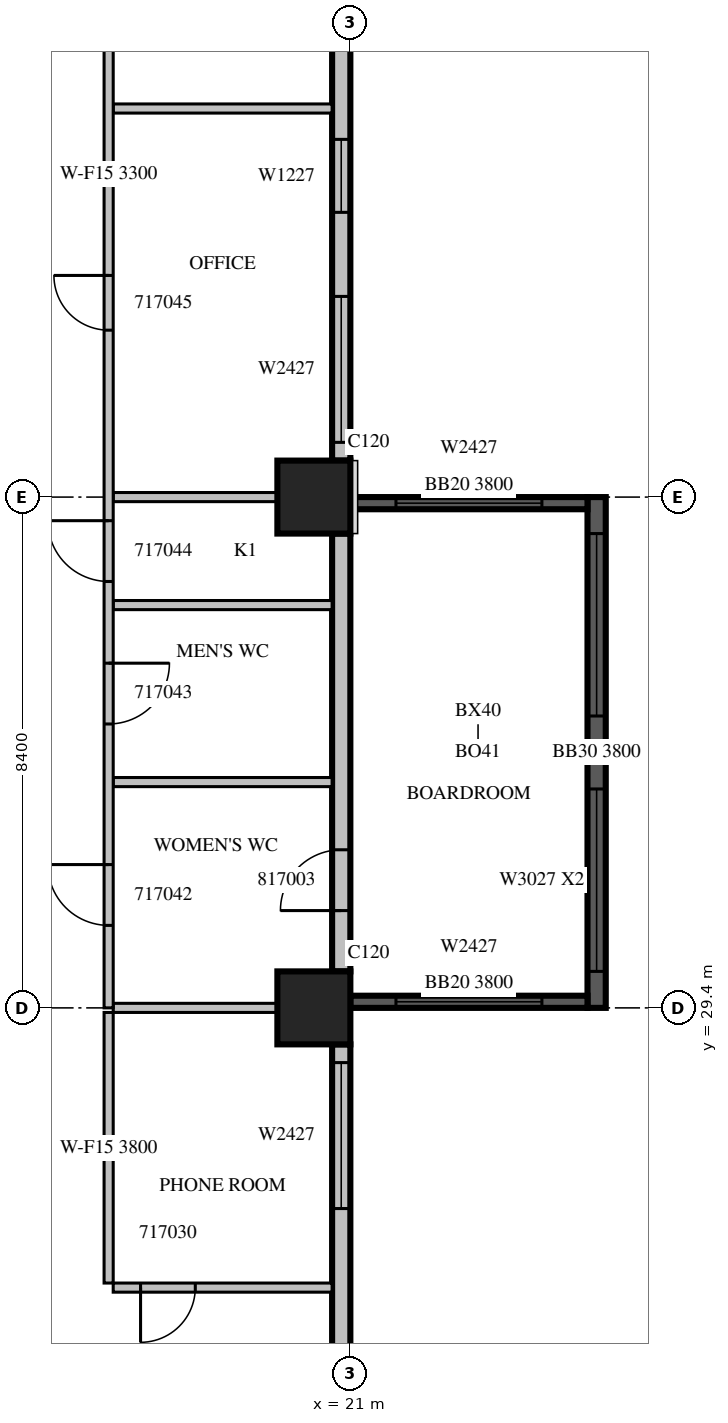
"""IFC4 building model, lengths in metres.
Left out: names, types, materials, properties, quantities, classifications, styles, units other than length and angle.
Written with IfcOpenShell. Run it as: python <this file> out.ifc"""

import sys

from ifc_helpers import new_model, si_unit, direction, frame, frame_2d, origin, origin_2d, place, context, subcontext, project, spatial, rectangle, extrude, source, transform, mapped, element, fill, save


model = new_model("IFC4")
c1 = context("Model", 3, precision=1e-05, world=origin(), true_north=direction((0.0, 1.0)))
c2 = subcontext(c1, "Body", "Model", "MODEL_VIEW")
j1 = project(units=[si_unit("LENGTHUNIT", "METRE"), si_unit("PLANEANGLEUNIT", "RADIAN")], contexts=[c1])
p1 = place(None, origin())
s1 = spatial("IfcSite", under=j1, at=p1, CompositionType="ELEMENT")
p2 = place(p1, origin())
s2 = spatial("IfcBuilding", under=s1, at=p2, CompositionType="ELEMENT")
p3 = place(p2, frame((0.0, 0.0, 82.5)))
s3 = spatial("IfcBuildingStorey", under=s2, at=p3, CompositionType="ELEMENT", Elevation=82.5)
m1 = source(origin(), c2, "Body", "SweptSolid", [
    extrude(rectangle(XDim=1.2, YDim=1.2, at=origin_2d()), origin(), (0.0, 0.0, 1.0), 4.2),
])
for number, where, z_axis, x_axis in (
    (1, (20.4, 29.4, 0.0), (0.0, 0.0, 1.0), (1.0, 0.0, 0.0)),
    (2, (20.4, 37.8, 0.0), (0.0, 0.0, 1.0), (1.0, 0.0, 0.0)),
):
    element("IfcColumn", number, at=place(p3, frame(where, z_axis=z_axis, x_axis=x_axis)), inside=s3, PredefinedType="COLUMN", context=c2, shape_type="MappedRepresentation", body=[
        mapped(m1, transform((0.0, 0.0, 0.0), scale=1.0)),
    ])
m2 = source(origin(), c2, "Body", "SweptSolid", [
    extrude(rectangle(XDim=8.4, YDim=0.3, at=frame_2d((4.2, 0.0))), origin(), (0.0, 0.0, 1.0), 3.8),
])
p4 = place(p3, frame((25.05, 29.4, 0.0), z_axis=(0.0, 0.0, 1.0), x_axis=(0.0, 1.0, 0.0)))
e3 = element("IfcWall", 3, at=p4, inside=s3, PredefinedType="SOLIDWALL", context=c2, shape_type="MappedRepresentation", body=[
    mapped(m2, transform((0.0, 0.0, 0.0), scale=1.0)),
])
m3 = source(origin(), c2, "Body", "SweptSolid", [
    extrude(rectangle(XDim=3.0, YDim=2.7, at=frame_2d((1.5, 1.35))), frame((0.0, 0.16, 0.0), z_axis=(0.0, -1.0, 0.0), x_axis=(1.0, 0.0, 0.0)), (0.0, 0.0, 1.0), 0.32),
])
p5 = place(p4, frame((0.6, 0.0, 0.6)))
e4 = element("IfcOpeningElement", 4, at=p5, cuts=e3, PredefinedType="OPENING", context=c2, shape_type="MappedRepresentation", body=[
    mapped(m3, transform((0.0, 0.0, 0.0), scale=1.0)),
])
p6 = place(p4, frame((4.8, 0.0, 0.6)))
e5 = element("IfcOpeningElement", 5, at=p6, cuts=e3, PredefinedType="OPENING", context=c2, shape_type="MappedRepresentation", body=[
    mapped(m3, transform((0.0, 0.0, 0.0), scale=1.0)),
])
m4 = source(origin(), c2, "Body", "SweptSolid", [
    extrude(rectangle(XDim=3.9, YDim=0.2, at=frame_2d((1.95, 0.0))), origin(), (0.0, 0.0, 1.0), 3.8),
])
p7 = place(p3, frame((21.0, 29.5, 0.0), z_axis=(0.0, 0.0, 1.0), x_axis=(1.0, 0.0, 0.0)))
e6 = element("IfcWall", 6, at=p7, inside=s3, PredefinedType="SOLIDWALL", context=c2, shape_type="MappedRepresentation", body=[
    mapped(m4, transform((0.0, 0.0, 0.0), scale=1.0)),
])
m5 = source(origin(), c2, "Body", "SweptSolid", [
    extrude(rectangle(XDim=2.4, YDim=2.7, at=frame_2d((1.2, 1.35))), frame((0.0, 0.11, 0.0), z_axis=(0.0, -1.0, 0.0), x_axis=(1.0, 0.0, 0.0)), (0.0, 0.0, 1.0), 0.22),
])
p8 = place(p7, frame((0.75, 0.0, 0.6)))
e7 = element("IfcOpeningElement", 7, at=p8, cuts=e6, PredefinedType="OPENING", context=c2, shape_type="MappedRepresentation", body=[
    mapped(m5, transform((0.0, 0.0, 0.0), scale=1.0)),
])
p9 = place(p3, frame((21.0, 37.7, 0.0), z_axis=(0.0, 0.0, 1.0), x_axis=(1.0, 0.0, 0.0)))
e8 = element("IfcWall", 8, at=p9, inside=s3, PredefinedType="SOLIDWALL", context=c2, shape_type="MappedRepresentation", body=[
    mapped(m4, transform((0.0, 0.0, 0.0), scale=1.0)),
])
p10 = place(p9, frame((0.75, 0.0, 0.6)))
e9 = element("IfcOpeningElement", 9, at=p10, cuts=e8, PredefinedType="OPENING", context=c2, shape_type="MappedRepresentation", body=[
    mapped(m5, transform((0.0, 0.0, 0.0), scale=1.0)),
])
m6 = source(origin(), c2, "Body", "SweptSolid", [
    extrude(rectangle(XDim=6.6, YDim=0.3, at=frame_2d((3.3, 0.0))), origin(), (0.0, 0.0, 1.0), 3.8),
])
p11 = place(p3, frame((20.85, 22.2, 0.0), z_axis=(0.0, 0.0, 1.0), x_axis=(0.0, 1.0, 0.0)))
e10 = element("IfcWall", 10, at=p11, inside=s3, PredefinedType="STANDARD", context=c2, shape_type="MappedRepresentation", body=[
    mapped(m6, transform((0.0, 0.0, 0.0), scale=1.0)),
])
m7 = source(origin(), c2, "Body", "SweptSolid", [
    extrude(rectangle(XDim=1.2, YDim=2.7, at=frame_2d((0.6, 1.35))), frame((0.0, 0.16, 0.0), z_axis=(0.0, -1.0, 0.0), x_axis=(1.0, 0.0, 0.0)), (0.0, 0.0, 1.0), 0.32),
])
p12 = place(p11, frame((0.3, 0.0, 0.6)))
e11 = element("IfcOpeningElement", 11, at=p12, cuts=e10, PredefinedType="OPENING", context=c2, shape_type="MappedRepresentation", body=[
    mapped(m7, transform((0.0, 0.0, 0.0), scale=1.0)),
])
m8 = source(origin(), c2, "Body", "SweptSolid", [
    extrude(rectangle(XDim=2.4, YDim=2.7, at=frame_2d((1.2, 1.35))), frame((0.0, 0.16, 0.0), z_axis=(0.0, -1.0, 0.0), x_axis=(1.0, 0.0, 0.0)), (0.0, 0.0, 1.0), 0.32),
])
p13 = place(p11, frame((3.9, 0.0, 0.6)))
e12 = element("IfcOpeningElement", 12, at=p13, cuts=e10, PredefinedType="OPENING", context=c2, shape_type="MappedRepresentation", body=[
    mapped(m8, transform((0.0, 0.0, 0.0), scale=1.0)),
])
m9 = source(origin(), c2, "Body", "SweptSolid", [
    extrude(rectangle(XDim=7.2, YDim=0.3, at=frame_2d((3.6, 0.0))), origin(), (0.0, 0.0, 1.0), 3.8),
])
p14 = place(p3, frame((20.85, 30.0, 0.0), z_axis=(0.0, 0.0, 1.0), x_axis=(0.0, 1.0, 0.0)))
e13 = element("IfcWall", 13, at=p14, inside=s3, PredefinedType="STANDARD", context=c2, shape_type="MappedRepresentation", body=[
    mapped(m9, transform((0.0, 0.0, 0.0), scale=1.0)),
])
m10 = source(origin(), c2, "Body", "SweptSolid", [
    extrude(rectangle(XDim=1.0, YDim=2.1, at=frame_2d((0.5, 1.05))), frame((0.0, 0.16, 0.0), z_axis=(0.0, -1.0, 0.0), x_axis=(1.0, 0.0, 0.0)), (0.0, 0.0, 1.0), 0.32),
])
p15 = place(p14, frame((1.0, 0.0, 0.0)))
e14 = element("IfcOpeningElement", 14, at=p15, cuts=e13, PredefinedType="OPENING", context=c2, shape_type="MappedRepresentation", body=[
    mapped(m10, transform((0.0, 0.0, 0.0), scale=1.0)),
])
p16 = place(p3, frame((20.85, 38.4, 0.0), z_axis=(0.0, 0.0, 1.0), x_axis=(0.0, 1.0, 0.0)))
e15 = element("IfcWall", 15, at=p16, inside=s3, PredefinedType="STANDARD", context=c2, shape_type="MappedRepresentation", body=[
    mapped(m9, transform((0.0, 0.0, 0.0), scale=1.0)),
])
p17 = place(p16, frame((0.3, 0.0, 0.6)))
e16 = element("IfcOpeningElement", 16, at=p17, cuts=e15, PredefinedType="OPENING", context=c2, shape_type="MappedRepresentation", body=[
    mapped(m8, transform((0.0, 0.0, 0.0), scale=1.0)),
])
p18 = place(p16, frame((4.082, 0.0, 0.6)))
e17 = element("IfcOpeningElement", 17, at=p18, cuts=e15, PredefinedType="OPENING", context=c2, shape_type="MappedRepresentation", body=[
    mapped(m7, transform((0.0, 0.0, 0.0), scale=1.0)),
])
m11 = source(origin(), c2, "Body", "SweptSolid", [
    extrude(rectangle(XDim=3.6, YDim=0.15, at=frame_2d((1.8, 0.0))), origin(), (0.0, 0.0, 1.0), 3.8),
])
p19 = place(p3, frame((17.1, 24.8, 0.0), z_axis=(0.0, 0.0, 1.0), x_axis=(1.0, 0.0, 0.0)))
e18 = element("IfcWall", 18, at=p19, inside=s3, PredefinedType="PARTITIONING", context=c2, shape_type="MappedRepresentation", body=[
    mapped(m11, transform((0.0, 0.0, 0.0), scale=1.0)),
])
m12 = source(origin(), c2, "Body", "SweptSolid", [
    extrude(rectangle(XDim=0.9, YDim=2.1, at=frame_2d((0.45, 1.05))), frame((0.0, 0.085, 0.0), z_axis=(0.0, -1.0, 0.0), x_axis=(1.0, 0.0, 0.0)), (0.0, 0.0, 1.0), 0.17),
])
p20 = place(p19, frame((0.45, 0.0, 0.0)))
e19 = element("IfcOpeningElement", 19, at=p20, cuts=e18, PredefinedType="OPENING", context=c2, shape_type="MappedRepresentation", body=[
    mapped(m12, transform((0.0, 0.0, 0.0), scale=1.0)),
])
m13 = source(origin(), c2, "Body", "SweptSolid", [
    extrude(rectangle(XDim=4.45, YDim=0.15, at=frame_2d((2.225, 0.0))), origin(), (0.0, 0.0, 1.0), 3.8),
])
p21 = place(p3, frame((17.025, 29.325, 0.0), z_axis=(0.0, 0.0, 1.0), x_axis=(0.0, -1.0, 0.0)))
e20 = element("IfcWall", 20, at=p21, inside=s3, PredefinedType="PARTITIONING", context=c2, shape_type="MappedRepresentation", body=[
    mapped(m13, transform((0.0, 0.0, 0.0), scale=1.0)),
])
m14 = source(origin(), c2, "Body", "SweptSolid", [
    extrude(rectangle(XDim=2.701, YDim=0.15, at=frame_2d((1.351, 0.0))), origin(), (0.0, 0.0, 1.0), 3.8),
])
p22 = place(p3, frame((19.801, 29.4, 0.0), z_axis=(0.0, 0.0, 1.0), x_axis=(-1.0, 0.0, 0.0)))
e21 = element("IfcWall", 21, at=p22, inside=s3, PredefinedType="PARTITIONING", context=c2, shape_type="MappedRepresentation", body=[
    mapped(m14, transform((0.0, 0.0, 0.0), scale=1.0)),
])
for number, where, z_axis, x_axis in (
    (22, (17.1, 33.113, 0.0), (0.0, 0.0, 1.0), (1.0, 0.0, 0.0)),
    (23, (17.1, 36.024, 0.0), (0.0, 0.0, 1.0), (1.0, 0.0, 0.0)),
    (24, (17.1, 44.19, 0.0), (0.0, 0.0, 1.0), (1.0, 0.0, 0.0)),
):
    element("IfcWall", number, at=place(p3, frame(where, z_axis=z_axis, x_axis=x_axis)), inside=s3, PredefinedType="PARTITIONING", context=c2, shape_type="MappedRepresentation", body=[
        mapped(m11, transform((0.0, 0.0, 0.0), scale=1.0)),
    ])
p23 = place(p3, frame((19.801, 37.8, 0.0), z_axis=(0.0, 0.0, 1.0), x_axis=(-1.0, 0.0, 0.0)))
e25 = element("IfcWall", 25, at=p23, inside=s3, PredefinedType="PARTITIONING", context=c2, shape_type="MappedRepresentation", body=[
    mapped(m14, transform((0.0, 0.0, 0.0), scale=1.0)),
])
p24 = place(p3, frame((17.025, 56.82, 0.0), z_axis=(0.0, 0.0, 1.0), x_axis=(0.0, -1.0, 0.0)))
e26 = element("IfcWall", 26, at=p24, inside=s3, PredefinedType="PARTITIONING", context=c2, shape_type="SweptSolid", body=[
    extrude(rectangle(XDim=27.42, YDim=0.15, at=frame_2d((13.71, 0.0))), origin(), (0.0, 0.0, 1.0), 3.3),
])
m15 = source(origin(), c2, "Body", "SweptSolid", [
    extrude(rectangle(XDim=1.0, YDim=2.1, at=frame_2d((0.5, 1.05))), frame((0.0, 0.085, 0.0), z_axis=(0.0, -1.0, 0.0), x_axis=(1.0, 0.0, 0.0)), (0.0, 0.0, 1.0), 0.17),
])
p25 = place(p24, frame((25.063, 0.0, 0.0)))
e27 = element("IfcOpeningElement", 27, at=p25, cuts=e26, PredefinedType="OPENING", context=c2, shape_type="MappedRepresentation", body=[
    mapped(m15, transform((0.0, 0.0, 0.0), scale=1.0)),
])
p26 = place(p24, frame((21.751, 0.0, 0.0)))
e28 = element("IfcOpeningElement", 28, at=p26, cuts=e26, PredefinedType="OPENING", context=c2, shape_type="MappedRepresentation", body=[
    mapped(m15, transform((0.0, 0.0, 0.0), scale=1.0)),
])
p27 = place(p24, frame((19.408, 0.0, 0.0)))
e29 = element("IfcOpeningElement", 29, at=p27, cuts=e26, PredefinedType="OPENING", context=c2, shape_type="MappedRepresentation", body=[
    mapped(m15, transform((0.0, 0.0, 0.0), scale=1.0)),
])
p28 = place(p24, frame((15.375, 0.0, 0.0)))
e30 = element("IfcOpeningElement", 30, at=p28, cuts=e26, PredefinedType="OPENING", context=c2, shape_type="MappedRepresentation", body=[
    mapped(m12, transform((0.0, 0.0, 0.0), scale=1.0)),
])
p29 = place(p24, frame((9.023, 0.0, 0.0)))
e31 = element("IfcOpeningElement", 31, at=p29, cuts=e26, PredefinedType="OPENING", context=c2, shape_type="MappedRepresentation", body=[
    mapped(m12, transform((0.0, 0.0, 0.0), scale=1.0)),
])
p30 = place(p24, frame((2.67, 0.0, 0.0)))
e32 = element("IfcOpeningElement", 32, at=p30, cuts=e26, PredefinedType="OPENING", context=c2, shape_type="MappedRepresentation", body=[
    mapped(m12, transform((0.0, 0.0, 0.0), scale=1.0)),
])
m16 = source(origin(), c2, "Body", "SweptSolid", [
    extrude(rectangle(XDim=3.0, YDim=2.7, at=frame_2d((1.5, 1.35))), frame((0.0, 0.03, 0.0), z_axis=(0.0, -1.0, 0.0), x_axis=(1.0, 0.0, 0.0)), (0.0, 0.0, 1.0), 0.06),
])
p31 = place(p5, origin())
e33 = element("IfcWindow", 33, at=p31, inside=s3, PartitioningType="SINGLE_PANEL", PredefinedType="WINDOW", context=c2, shape_type="MappedRepresentation", body=[
    mapped(m16, transform((0.0, 0.0, 0.0), scale=1.0)),
])
fill(e4, e33)
p32 = place(p6, origin())
e34 = element("IfcWindow", 34, at=p32, inside=s3, PartitioningType="SINGLE_PANEL", PredefinedType="WINDOW", context=c2, shape_type="MappedRepresentation", body=[
    mapped(m16, transform((0.0, 0.0, 0.0), scale=1.0)),
])
fill(e5, e34)
m17 = source(origin(), c2, "Body", "SweptSolid", [
    extrude(rectangle(XDim=2.4, YDim=2.7, at=frame_2d((1.2, 1.35))), frame((0.0, 0.03, 0.0), z_axis=(0.0, -1.0, 0.0), x_axis=(1.0, 0.0, 0.0)), (0.0, 0.0, 1.0), 0.06),
])
p33 = place(p8, origin())
e35 = element("IfcWindow", 35, at=p33, inside=s3, PartitioningType="SINGLE_PANEL", PredefinedType="WINDOW", context=c2, shape_type="MappedRepresentation", body=[
    mapped(m17, transform((0.0, 0.0, 0.0), scale=1.0)),
])
fill(e7, e35)
p34 = place(p10, origin())
e36 = element("IfcWindow", 36, at=p34, inside=s3, PartitioningType="SINGLE_PANEL", PredefinedType="WINDOW", context=c2, shape_type="MappedRepresentation", body=[
    mapped(m17, transform((0.0, 0.0, 0.0), scale=1.0)),
])
fill(e9, e36)
p35 = place(p13, origin())
e37 = element("IfcWindow", 37, at=p35, inside=s3, PartitioningType="SINGLE_PANEL", PredefinedType="WINDOW", context=c2, shape_type="MappedRepresentation", body=[
    mapped(m17, transform((0.0, 0.0, 0.0), scale=1.0)),
])
fill(e12, e37)
p36 = place(p17, origin())
e38 = element("IfcWindow", 38, at=p36, inside=s3, PartitioningType="SINGLE_PANEL", PredefinedType="WINDOW", context=c2, shape_type="MappedRepresentation", body=[
    mapped(m17, transform((0.0, 0.0, 0.0), scale=1.0)),
])
fill(e16, e38)
m18 = source(origin(), c2, "Body", "SweptSolid", [
    extrude(rectangle(XDim=1.2, YDim=2.7, at=frame_2d((0.6, 1.35))), frame((0.0, 0.03, 0.0), z_axis=(0.0, -1.0, 0.0), x_axis=(1.0, 0.0, 0.0)), (0.0, 0.0, 1.0), 0.06),
])
p37 = place(p18, origin())
e39 = element("IfcWindow", 39, at=p37, inside=s3, PartitioningType="SINGLE_PANEL", PredefinedType="WINDOW", context=c2, shape_type="MappedRepresentation", body=[
    mapped(m18, transform((0.0, 0.0, 0.0), scale=1.0)),
])
fill(e17, e39)
m19 = source(origin(), c2, "Body", "SweptSolid", [
    extrude(rectangle(XDim=0.9, YDim=2.1, at=frame_2d((0.45, 1.05))), frame((0.0, 0.025, 0.0), z_axis=(0.0, -1.0, 0.0), x_axis=(1.0, 0.0, 0.0)), (0.0, 0.0, 1.0), 0.05),
])
p38 = place(p20, origin())
e40 = element("IfcDoor", 40, at=p38, inside=s3, OperationType="SINGLE_SWING_RIGHT", PredefinedType="DOOR", context=c2, shape_type="MappedRepresentation", body=[
    mapped(m19, transform((0.0, 0.0, 0.0), scale=1.0)),
])
fill(e19, e40)
m20 = source(origin(), c2, "Body", "SweptSolid", [
    extrude(rectangle(XDim=1.0, YDim=2.1, at=frame_2d((0.5, 1.05))), frame((0.0, 0.025, 0.0), z_axis=(0.0, -1.0, 0.0), x_axis=(1.0, 0.0, 0.0)), (0.0, 0.0, 1.0), 0.05),
])
p39 = place(p25, origin())
e41 = element("IfcDoor", 41, at=p39, inside=s3, OperationType="SINGLE_SWING_RIGHT", PredefinedType="DOOR", context=c2, shape_type="MappedRepresentation", body=[
    mapped(m20, transform((0.0, 0.0, 0.0), scale=1.0)),
])
fill(e27, e41)
p40 = place(p26, origin())
e42 = element("IfcDoor", 42, at=p40, inside=s3, OperationType="SINGLE_SWING_LEFT", PredefinedType="DOOR", context=c2, shape_type="MappedRepresentation", body=[
    mapped(m20, transform((0.0, 0.0, 0.0), scale=1.0)),
])
fill(e28, e42)
p41 = place(p27, origin())
e43 = element("IfcDoor", 43, at=p41, inside=s3, OperationType="SINGLE_SWING_RIGHT", PredefinedType="DOOR", context=c2, shape_type="MappedRepresentation", body=[
    mapped(m20, transform((0.0, 0.0, 0.0), scale=1.0)),
])
fill(e29, e43)
p42 = place(p28, origin())
e44 = element("IfcDoor", 44, at=p42, inside=s3, OperationType="SINGLE_SWING_RIGHT", PredefinedType="DOOR", context=c2, shape_type="MappedRepresentation", body=[
    mapped(m19, transform((0.0, 0.0, 0.0), scale=1.0)),
])
fill(e30, e44)
p43 = place(p15, origin())
e45 = element("IfcDoor", 45, at=p43, inside=s3, OperationType="SINGLE_SWING_LEFT", PredefinedType="DOOR", context=c2, shape_type="MappedRepresentation", body=[
    mapped(m20, transform((0.0, 0.0, 0.0), scale=1.0)),
])
fill(e14, e45)
save(model, sys.argv[1])
